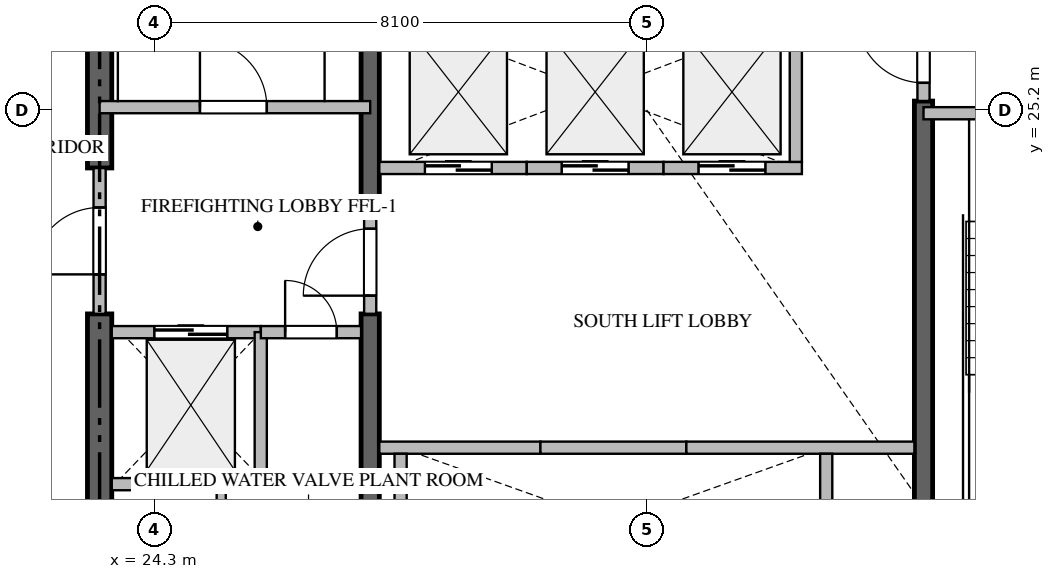
"""IFC4 building model, lengths in metres.
Left out: names, types, materials, properties, quantities, classifications, styles, units other than length and angle.
Written with IfcOpenShell. Run it as: python <this file> out.ifc"""

import sys

from ifc_helpers import new_model, si_unit, direction, frame, frame_2d, origin, place, context, subcontext, project, spatial, rectangle, extrude, source, transform, mapped, element, fill, save


model = new_model("IFC4")
c1 = context("Model", 3, precision=1e-05, world=origin(), true_north=direction((0.0, 1.0)))
c2 = subcontext(c1, "Body", "Model", "MODEL_VIEW")
j1 = project(units=[si_unit("LENGTHUNIT", "METRE"), si_unit("PLANEANGLEUNIT", "RADIAN")], contexts=[c1])
p1 = place(None, origin())
s1 = spatial("IfcSite", under=j1, at=p1, CompositionType="ELEMENT")
p2 = place(p1, origin())
s2 = spatial("IfcBuilding", under=s1, at=p2, CompositionType="ELEMENT")
p3 = place(p2, frame((0.0, 0.0, 120.15)))
s3 = spatial("IfcBuildingStorey", under=s2, at=p3, CompositionType="ELEMENT", Elevation=120.15)
p4 = place(p3, frame((23.4, 17.0, -0.44), z_axis=(0.0, 0.0, 1.0), x_axis=(0.0, 1.0, 0.0)))
e1 = element("IfcWall", 1, at=p4, inside=s3, PredefinedType="SHEAR", context=c2, shape_type="SweptSolid", body=[
    extrude(rectangle(XDim=4.85, YDim=0.4, at=frame_2d((2.425, 0.0))), origin(), (0.0, 0.0, 1.0), 3.928),
])
p5 = place(p3, frame((23.4, 24.25, -0.44), z_axis=(0.0, 0.0, 1.0), x_axis=(0.0, 1.0, 0.0)))
e2 = element("IfcWall", 2, at=p5, inside=s3, PredefinedType="SHEAR", context=c2, shape_type="SweptSolid", body=[
    extrude(rectangle(XDim=9.15, YDim=0.4, at=frame_2d((4.575, 0.0))), origin(), (0.0, 0.0, 1.0), 3.928),
])
p6 = place(p3, frame((27.85, 17.0, -0.44), z_axis=(0.0, 0.0, 1.0), x_axis=(0.0, 1.0, 0.0)))
e3 = element("IfcWall", 3, at=p6, inside=s3, PredefinedType="SHEAR", context=c2, shape_type="SweptSolid", body=[
    extrude(rectangle(XDim=4.85, YDim=0.3, at=frame_2d((2.425, 0.0))), origin(), (0.0, 0.0, 1.0), 3.928),
])
p7 = place(p3, frame((27.85, 23.55, -0.44), z_axis=(0.0, 0.0, 1.0), x_axis=(0.0, 1.0, 0.0)))
e4 = element("IfcWall", 4, at=p7, inside=s3, PredefinedType="SHEAR", context=c2, shape_type="SweptSolid", body=[
    extrude(rectangle(XDim=9.85, YDim=0.3, at=frame_2d((4.925, 0.0))), origin(), (0.0, 0.0, 1.0), 3.928),
])
p8 = place(p3, frame((36.95, 17.0, -0.44), z_axis=(0.0, 0.0, 1.0), x_axis=(0.0, 1.0, 0.0)))
e5 = element("IfcWall", 5, at=p8, inside=s3, PredefinedType="SHEAR", context=c2, shape_type="SweptSolid", body=[
    extrude(rectangle(XDim=8.35, YDim=0.3, at=frame_2d((4.175, 0.0))), origin(), (0.0, 0.0, 1.0), 3.928),
])
p9 = place(p3, frame((23.4, 25.25, 0.0), z_axis=(0.0, 0.0, 1.0), x_axis=(1.0, 0.0, 0.0)))
e6 = element("IfcWall", 6, at=p9, inside=s3, PredefinedType="STANDARD", context=c2, shape_type="SweptSolid", body=[
    extrude(rectangle(XDim=4.45, YDim=0.2, at=frame_2d((2.225, 0.0))), origin(), (0.0, 0.0, 1.0), 3.49),
])
p10 = place(p9, frame((1.65, 0.0, 0.0)))
e7 = element("IfcOpeningElement", 7, at=p10, cuts=e6, PredefinedType="OPENING", context=c2, shape_type="SweptSolid", body=[
    extrude(rectangle(XDim=1.1, YDim=2.15, at=frame_2d((0.55, 1.075))), frame((0.0, 0.11, 0.0), z_axis=(0.0, -1.0, 0.0), x_axis=(1.0, 0.0, 0.0)), (0.0, 0.0, 1.0), 0.22),
])
p11 = place(p3, frame((36.95, 25.15, 0.0), z_axis=(0.0, 0.0, 1.0), x_axis=(1.0, 0.0, 0.0)))
e8 = element("IfcWall", 8, at=p11, inside=s3, PredefinedType="STANDARD", context=c2, shape_type="SweptSolid", body=[
    extrude(rectangle(XDim=4.45, YDim=0.2, at=frame_2d((2.225, 0.0))), origin(), (0.0, 0.0, 1.0), 3.49),
])
p12 = place(p11, frame((1.65, 0.0, 0.0)))
e9 = element("IfcOpeningElement", 9, at=p12, cuts=e8, PredefinedType="OPENING", context=c2, shape_type="SweptSolid", body=[
    extrude(rectangle(XDim=1.1, YDim=2.15, at=frame_2d((0.55, 1.075))), frame((0.0, 0.11, 0.0), z_axis=(0.0, -1.0, 0.0), x_axis=(1.0, 0.0, 0.0)), (0.0, 0.0, 1.0), 0.22),
])
p13 = place(p3, frame((23.6, 21.55, 0.0), z_axis=(0.0, 0.0, 1.0), x_axis=(1.0, 0.0, 0.0)))
e10 = element("IfcWall", 10, at=p13, inside=s3, PredefinedType="STANDARD", context=c2, shape_type="SweptSolid", body=[
    extrude(rectangle(XDim=2.45, YDim=0.2, at=frame_2d((1.225, 0.0))), origin(), (0.0, 0.0, 1.0), 3.49),
])
p14 = place(p13, frame((0.7, 0.0, 0.0)))
e11 = element("IfcOpeningElement", 11, at=p14, cuts=e10, PredefinedType="OPENING", context=c2, shape_type="SweptSolid", body=[
    extrude(rectangle(XDim=1.2, YDim=2.2, at=frame_2d((0.6, 1.1))), frame((0.0, 0.11, 0.0), z_axis=(0.0, -1.0, 0.0), x_axis=(1.0, 0.0, 0.0)), (0.0, 0.0, 1.0), 0.22),
])
p15 = place(p3, frame((28.0, 19.65, 0.0), z_axis=(0.0, 0.0, 1.0), x_axis=(1.0, 0.0, 0.0)))
e12 = element("IfcWall", 12, at=p15, inside=s3, PredefinedType="STANDARD", context=c2, shape_type="SweptSolid", body=[
    extrude(rectangle(XDim=2.65, YDim=0.2, at=frame_2d((1.325, 0.0))), origin(), (0.0, 0.0, 1.0), 3.49),
])
p16 = place(p3, frame((28.35, 17.0, 0.0), z_axis=(0.0, 0.0, 1.0), x_axis=(0.0, 1.0, 0.0)))
e13 = element("IfcWall", 13, at=p16, inside=s3, PredefinedType="STANDARD", context=c2, shape_type="SweptSolid", body=[
    extrude(rectangle(XDim=2.55, YDim=0.2, at=frame_2d((1.275, 0.0))), origin(), (0.0, 0.0, 1.0), 3.49),
])
p17 = place(p3, frame((30.65, 19.65, 0.0), z_axis=(0.0, 0.0, 1.0), x_axis=(1.0, 0.0, 0.0)))
e14 = element("IfcWall", 14, at=p17, inside=s3, PredefinedType="STANDARD", context=c2, shape_type="SweptSolid", body=[
    extrude(rectangle(XDim=2.4, YDim=0.2, at=frame_2d((1.2, 0.0))), origin(), (0.0, 0.0, 1.0), 3.49),
])
p18 = place(p3, frame((33.05, 19.65, 0.0), z_axis=(0.0, 0.0, 1.0), x_axis=(1.0, 0.0, 0.0)))
e15 = element("IfcWall", 15, at=p18, inside=s3, PredefinedType="STANDARD", context=c2, shape_type="SweptSolid", body=[
    extrude(rectangle(XDim=3.75, YDim=0.2, at=frame_2d((1.875, 0.0))), origin(), (0.0, 0.0, 1.0), 3.49),
])
p19 = place(p3, frame((35.35, 17.0, 0.0), z_axis=(0.0, 0.0, 1.0), x_axis=(0.0, 1.0, 0.0)))
e16 = element("IfcWall", 16, at=p19, inside=s3, PredefinedType="STANDARD", context=c2, shape_type="SweptSolid", body=[
    extrude(rectangle(XDim=2.55, YDim=0.2, at=frame_2d((1.275, 0.0))), origin(), (0.0, 0.0, 1.0), 3.49),
])
p20 = place(p3, frame((28.0, 24.25, 0.0), z_axis=(0.0, 0.0, 1.0), x_axis=(1.0, 0.0, 0.0)))
e17 = element("IfcWall", 17, at=p20, inside=s3, PredefinedType="STANDARD", context=c2, shape_type="SweptSolid", body=[
    extrude(rectangle(XDim=2.425, YDim=0.2, at=frame_2d((1.212, 0.0))), origin(), (0.0, 0.0, 1.0), 3.49),
])
p21 = place(p20, frame((0.75, 0.0, 0.0)))
e18 = element("IfcOpeningElement", 18, at=p21, cuts=e17, PredefinedType="OPENING", context=c2, shape_type="SweptSolid", body=[
    extrude(rectangle(XDim=1.1, YDim=2.2, at=frame_2d((0.55, 1.1))), frame((0.0, 0.11, 0.0), z_axis=(0.0, -1.0, 0.0), x_axis=(1.0, 0.0, 0.0)), (0.0, 0.0, 1.0), 0.22),
])
p22 = place(p3, frame((30.425, 24.25, 0.0), z_axis=(0.0, 0.0, 1.0), x_axis=(1.0, 0.0, 0.0)))
e19 = element("IfcWall", 19, at=p22, inside=s3, PredefinedType="STANDARD", context=c2, shape_type="SweptSolid", body=[
    extrude(rectangle(XDim=2.25, YDim=0.2, at=frame_2d((1.125, 0.0))), origin(), (0.0, 0.0, 1.0), 3.49),
])
p23 = place(p22, frame((0.575, 0.0, 0.0)))
e20 = element("IfcOpeningElement", 20, at=p23, cuts=e19, PredefinedType="OPENING", context=c2, shape_type="SweptSolid", body=[
    extrude(rectangle(XDim=1.1, YDim=2.2, at=frame_2d((0.55, 1.1))), frame((0.0, 0.11, 0.0), z_axis=(0.0, -1.0, 0.0), x_axis=(1.0, 0.0, 0.0)), (0.0, 0.0, 1.0), 0.22),
])
p24 = place(p3, frame((32.675, 24.25, 0.0), z_axis=(0.0, 0.0, 1.0), x_axis=(1.0, 0.0, 0.0)))
e21 = element("IfcWall", 21, at=p24, inside=s3, PredefinedType="STANDARD", context=c2, shape_type="SweptSolid", body=[
    extrude(rectangle(XDim=2.275, YDim=0.2, at=frame_2d((1.137, 0.0))), origin(), (0.0, 0.0, 1.0), 3.49),
])
p25 = place(p24, frame((0.575, 0.0, 0.0)))
e22 = element("IfcOpeningElement", 22, at=p25, cuts=e21, PredefinedType="OPENING", context=c2, shape_type="SweptSolid", body=[
    extrude(rectangle(XDim=1.1, YDim=2.2, at=frame_2d((0.55, 1.1))), frame((0.0, 0.11, 0.0), z_axis=(0.0, -1.0, 0.0), x_axis=(1.0, 0.0, 0.0)), (0.0, 0.0, 1.0), 0.22),
])
for number, where, z_axis, x_axis in (
    (23, (34.85, 24.35, 0.0), (0.0, 0.0, 1.0), (0.0, 1.0, 0.0)),
    (24, (26.05, 19.05, 0.0), (0.0, 0.0, 1.0), (0.0, 1.0, 0.0)),
):
    element("IfcWall", number, at=place(p3, frame(where, z_axis=z_axis, x_axis=x_axis)), inside=s3, PredefinedType="STANDARD", context=c2, shape_type="SweptSolid", body=[
        extrude(rectangle(XDim=2.5, YDim=0.2, at=frame_2d((1.25, 0.0))), origin(), (0.0, 0.0, 1.0), 3.49),
    ])
p26 = place(p3, frame((23.6, 19.05, 0.0), z_axis=(0.0, 0.0, 1.0), x_axis=(1.0, 0.0, 0.0)))
e25 = element("IfcWall", 25, at=p26, inside=s3, PredefinedType="STANDARD", context=c2, shape_type="SweptSolid", body=[
    extrude(rectangle(XDim=2.45, YDim=0.2, at=frame_2d((1.225, 0.0))), origin(), (0.0, 0.0, 1.0), 3.49),
])
p27 = place(p3, frame((26.052, 21.55, 0.0), z_axis=(0.0, 0.0, 1.0), x_axis=(1.0, 0.0, 0.0)))
e26 = element("IfcWall", 26, at=p27, inside=s3, PredefinedType="STANDARD", context=c2, shape_type="SweptSolid", body=[
    extrude(rectangle(XDim=1.648, YDim=0.2, at=frame_2d((0.824, 0.0))), origin(), (0.0, 0.0, 1.0), 3.49),
])
p28 = place(p27, frame((0.399, 0.0, 0.0)))
e27 = element("IfcOpeningElement", 27, at=p28, cuts=e26, PredefinedType="OPENING", context=c2, shape_type="SweptSolid", body=[
    extrude(rectangle(XDim=0.85, YDim=2.1, at=frame_2d((0.425, 1.05))), frame((0.0, 0.11, 0.0), z_axis=(0.0, -1.0, 0.0), x_axis=(1.0, 0.0, 0.0)), (0.0, 0.0, 1.0), 0.22),
])
p29 = place(p3, frame((23.4, 21.852, 0.0), z_axis=(0.0, 0.0, 1.0), x_axis=(0.0, 1.0, 0.0)))
e28 = element("IfcWall", 28, at=p29, inside=s3, PredefinedType="STANDARD", context=c2, shape_type="SweptSolid", body=[
    extrude(rectangle(XDim=2.396, YDim=0.2, at=frame_2d((1.198, 0.0))), origin(), (0.0, 0.0, 1.0), 3.49),
])
p30 = place(p29, frame((0.648, 0.0, 0.0)))
e29 = element("IfcOpeningElement", 29, at=p30, cuts=e28, PredefinedType="OPENING", context=c2, shape_type="SweptSolid", body=[
    extrude(rectangle(XDim=1.1, YDim=2.15, at=frame_2d((0.55, 1.075))), frame((0.0, 0.11, 0.0), z_axis=(0.0, -1.0, 0.0), x_axis=(1.0, 0.0, 0.0)), (0.0, 0.0, 1.0), 0.22),
])
p31 = place(p3, frame((27.85, 21.852, 0.0), z_axis=(0.0, 0.0, 1.0), x_axis=(0.0, 1.0, 0.0)))
e30 = element("IfcWall", 30, at=p31, inside=s3, PredefinedType="STANDARD", context=c2, shape_type="SweptSolid", body=[
    extrude(rectangle(XDim=1.696, YDim=0.2, at=frame_2d((0.848, 0.0))), origin(), (0.0, 0.0, 1.0), 3.49),
])
p32 = place(p31, frame((0.298, 0.0, 0.0)))
e31 = element("IfcOpeningElement", 31, at=p32, cuts=e30, PredefinedType="OPENING", context=c2, shape_type="SweptSolid", body=[
    extrude(rectangle(XDim=1.1, YDim=2.15, at=frame_2d((0.55, 1.075))), frame((0.0, 0.11, 0.0), z_axis=(0.0, -1.0, 0.0), x_axis=(1.0, 0.0, 0.0)), (0.0, 0.0, 1.0), 0.22),
])
p33 = place(p3, frame((36.95, 25.352, 0.0), z_axis=(0.0, 0.0, 1.0), x_axis=(0.0, 1.0, 0.0)))
e32 = element("IfcWall", 32, at=p33, inside=s3, PredefinedType="STANDARD", context=c2, shape_type="SweptSolid", body=[
    extrude(rectangle(XDim=1.696, YDim=0.2, at=frame_2d((0.848, 0.0))), origin(), (0.0, 0.0, 1.0), 3.49),
])
p34 = place(p33, frame((0.298, 0.0, 0.0)))
e33 = element("IfcOpeningElement", 33, at=p34, cuts=e32, PredefinedType="OPENING", context=c2, shape_type="SweptSolid", body=[
    extrude(rectangle(XDim=1.1, YDim=2.15, at=frame_2d((0.55, 1.075))), frame((0.0, 0.11, 0.0), z_axis=(0.0, -1.0, 0.0), x_axis=(1.0, 0.0, 0.0)), (0.0, 0.0, 1.0), 0.22),
])
p35 = place(p3, frame((25.4, 17.0, 0.0), z_axis=(0.0, 0.0, 1.0), x_axis=(0.0, 1.0, 0.0)))
e34 = element("IfcWall", 34, at=p35, inside=s3, PredefinedType="PARTITIONING", context=c2, shape_type="SweptSolid", body=[
    extrude(rectangle(XDim=2.05, YDim=0.15, at=frame_2d((1.025, 0.0))), origin(), (0.0, 0.0, 1.0), 3.49),
])
p36 = place(p35, frame((0.6, 0.0, 0.0)))
e35 = element("IfcOpeningElement", 35, at=p36, cuts=e34, PredefinedType="OPENING", context=c2, shape_type="SweptSolid", body=[
    extrude(rectangle(XDim=0.85, YDim=2.1, at=frame_2d((0.425, 1.05))), frame((0.0, 0.085, 0.0), z_axis=(0.0, -1.0, 0.0), x_axis=(1.0, 0.0, 0.0)), (0.0, 0.0, 1.0), 0.17),
])
m1 = source(origin(), c2, "Body", "SweptSolid", [
    extrude(rectangle(XDim=1.1, YDim=2.15, at=frame_2d((0.55, 1.075))), frame((0.0, 0.025, 0.0), z_axis=(0.0, -1.0, 0.0), x_axis=(1.0, 0.0, 0.0)), (0.0, 0.0, 1.0), 0.05),
])
p37 = place(p10, origin())
e36 = element("IfcDoor", 36, at=p37, inside=s3, OperationType="SINGLE_SWING_LEFT", PredefinedType="DOOR", context=c2, shape_type="MappedRepresentation", body=[
    mapped(m1, transform((0.0, 0.0, 0.0), scale=1.0)),
])
fill(e7, e36)
m2 = source(origin(), c2, "Body", "SweptSolid", [
    extrude(rectangle(XDim=1.2, YDim=2.2, at=frame_2d((0.6, 1.1))), frame((0.0, 0.025, 0.0), z_axis=(0.0, -1.0, 0.0), x_axis=(1.0, 0.0, 0.0)), (0.0, 0.0, 1.0), 0.05),
])
p38 = place(p14, origin())
e37 = element("IfcDoor", 37, at=p38, inside=s3, OperationType="DOUBLE_DOOR_SLIDING", PredefinedType="DOOR", context=c2, shape_type="MappedRepresentation", body=[
    mapped(m2, transform((0.0, 0.0, 0.0), scale=1.0)),
])
fill(e11, e37)
m3 = source(origin(), c2, "Body", "SweptSolid", [
    extrude(rectangle(XDim=1.1, YDim=2.2, at=frame_2d((0.55, 1.1))), frame((0.0, 0.025, 0.0), z_axis=(0.0, -1.0, 0.0), x_axis=(1.0, 0.0, 0.0)), (0.0, 0.0, 1.0), 0.05),
])
p39 = place(p21, origin())
e38 = element("IfcDoor", 38, at=p39, inside=s3, OperationType="DOUBLE_DOOR_SLIDING", PredefinedType="DOOR", context=c2, shape_type="MappedRepresentation", body=[
    mapped(m3, transform((0.0, 0.0, 0.0), scale=1.0)),
])
fill(e18, e38)
p40 = place(p23, origin())
e39 = element("IfcDoor", 39, at=p40, inside=s3, OperationType="DOUBLE_DOOR_SLIDING", PredefinedType="DOOR", context=c2, shape_type="MappedRepresentation", body=[
    mapped(m3, transform((0.0, 0.0, 0.0), scale=1.0)),
])
fill(e20, e39)
p41 = place(p25, origin())
e40 = element("IfcDoor", 40, at=p41, inside=s3, OperationType="DOUBLE_DOOR_SLIDING", PredefinedType="DOOR", context=c2, shape_type="MappedRepresentation", body=[
    mapped(m3, transform((0.0, 0.0, 0.0), scale=1.0)),
])
fill(e22, e40)
m4 = source(origin(), c2, "Body", "SweptSolid", [
    extrude(rectangle(XDim=0.85, YDim=2.1, at=frame_2d((0.425, 1.05))), frame((0.0, 0.025, 0.0), z_axis=(0.0, -1.0, 0.0), x_axis=(1.0, 0.0, 0.0)), (0.0, 0.0, 1.0), 0.05),
])
p42 = place(p28, origin())
e41 = element("IfcDoor", 41, at=p42, inside=s3, OperationType="SINGLE_SWING_LEFT", PredefinedType="DOOR", context=c2, shape_type="MappedRepresentation", body=[
    mapped(m4, transform((0.0, 0.0, 0.0), scale=1.0)),
])
fill(e27, e41)
p43 = place(p30, origin())
e42 = element("IfcDoor", 42, at=p43, inside=s3, OperationType="SINGLE_SWING_LEFT", PredefinedType="DOOR", context=c2, shape_type="MappedRepresentation", body=[
    mapped(m1, transform((0.0, 0.0, 0.0), scale=1.0)),
])
fill(e29, e42)
p44 = place(p32, origin())
e43 = element("IfcDoor", 43, at=p44, inside=s3, OperationType="SINGLE_SWING_LEFT", PredefinedType="DOOR", context=c2, shape_type="MappedRepresentation", body=[
    mapped(m1, transform((0.0, 0.0, 0.0), scale=1.0)),
])
fill(e31, e43)
p45 = place(p34, origin())
e44 = element("IfcDoor", 44, at=p45, inside=s3, OperationType="SINGLE_SWING_RIGHT", PredefinedType="DOOR", context=c2, shape_type="MappedRepresentation", body=[
    mapped(m1, transform((0.0, 0.0, 0.0), scale=1.0)),
])
fill(e33, e44)
save(model, sys.argv[1])
